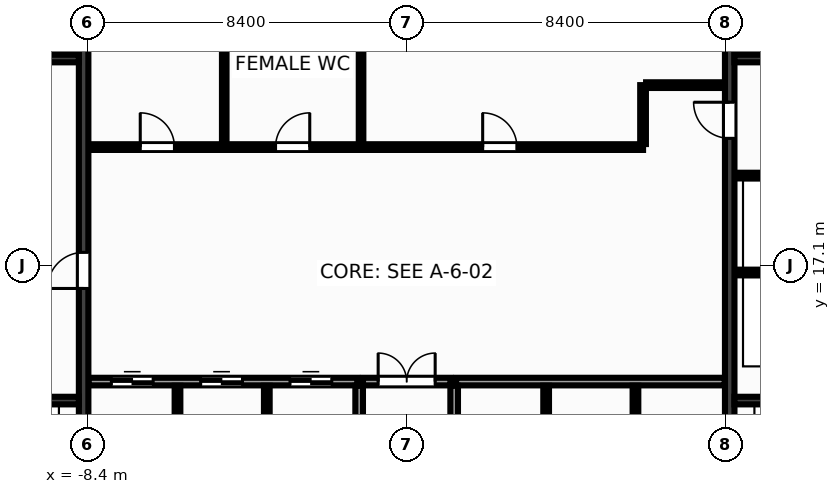
"""IFC4 building model, lengths in metres.
Left out: names, types, materials, properties, quantities, classifications, styles, units other than length and angle.
Written with IfcOpenShell. Run it as: python <this file> out.ifc"""

import sys

from ifc_helpers import new_model, si_unit, direction, frame, frame_2d, origin, place, context, subcontext, project, spatial, rectangle, extrude, source, transform, mapped, element, fill, save


model = new_model("IFC4")
c1 = context("Model", 3, precision=1e-05, world=origin(), true_north=direction((0.0, 1.0)))
c2 = subcontext(c1, "Body", "Model", "MODEL_VIEW")
j1 = project(units=[si_unit("LENGTHUNIT", "METRE"), si_unit("PLANEANGLEUNIT", "RADIAN")], contexts=[c1])
p1 = place(None, origin())
s1 = spatial("IfcSite", under=j1, at=p1, CompositionType="ELEMENT")
p2 = place(p1, origin())
s2 = spatial("IfcBuilding", under=s1, at=p2, CompositionType="ELEMENT")
p3 = place(p2, frame((0.0, 0.0, 5.0)))
s3 = spatial("IfcBuildingStorey", under=s2, at=p3, CompositionType="ELEMENT", Elevation=5.0)
m1 = source(origin(), c2, "Body", "SweptSolid", [
    extrude(rectangle(XDim=12.8, YDim=0.25, at=frame_2d((6.4, 0.0))), origin(), (0.0, 0.0, 1.0), 4.65),
])
p4 = place(p3, frame((-8.5, 10.6, 0.0), z_axis=(0.0, 0.0, 1.0), x_axis=(0.0, 1.0, 0.0)))
e1 = element("IfcWall", 1, at=p4, inside=s3, PredefinedType="SHEAR", context=c2, shape_type="MappedRepresentation", body=[
    mapped(m1, transform((0.0, 0.0, 0.0), x_axis=(1.0, 0.0, 0.0), y_axis=(0.0, 1.0, 0.0), z_axis=(0.0, 0.0, 1.0), scale=1.0)),
])
p5 = place(p4, frame((5.9, 0.0, 0.0)))
e2 = element("IfcOpeningElement", 2, at=p5, cuts=e1, PredefinedType="OPENING", context=c2, shape_type="SweptSolid", body=[
    extrude(rectangle(XDim=0.95, YDim=2.15, at=frame_2d((0.475, 1.075))), frame((0.0, 0.137, 0.0), z_axis=(0.0, -1.0, 0.0), x_axis=(1.0, 0.0, 0.0)), (0.0, 0.0, 1.0), 0.274),
])
p6 = place(p3, frame((8.5, 10.6, 0.0), z_axis=(0.0, 0.0, 1.0), x_axis=(0.0, 1.0, 0.0)))
e3 = element("IfcWall", 3, at=p6, inside=s3, PredefinedType="SHEAR", context=c2, shape_type="MappedRepresentation", body=[
    mapped(m1, transform((0.0, 0.0, 0.0), x_axis=(1.0, 0.0, 0.0), y_axis=(0.0, 1.0, 0.0), z_axis=(0.0, 0.0, 1.0), scale=1.0)),
])
p7 = place(p6, frame((9.85, 0.0, 0.0)))
e4 = element("IfcOpeningElement", 4, at=p7, cuts=e3, PredefinedType="OPENING", context=c2, shape_type="SweptSolid", body=[
    extrude(rectangle(XDim=0.95, YDim=2.15, at=frame_2d((0.475, 1.075))), frame((0.0, 0.137, 0.0), z_axis=(0.0, -1.0, 0.0), x_axis=(1.0, 0.0, 0.0)), (0.0, 0.0, 1.0), 0.274),
])
m2 = source(origin(), c2, "Body", "SweptSolid", [
    extrude(rectangle(XDim=2.825, YDim=0.2, at=frame_2d((1.413, 0.0))), origin(), (0.0, 0.0, 1.0), 4.65),
])
for number, where, z_axis, x_axis in (
    (5, (-11.45, 13.55, 0.0), (0.0, 0.0, 1.0), (1.0, 0.0, 0.0)),
    (6, (8.625, 13.55, 0.0), (0.0, 0.0, 1.0), (1.0, 0.0, 0.0)),
):
    element("IfcWall", number, at=place(p3, frame(where, z_axis=z_axis, x_axis=x_axis)), inside=s3, PredefinedType="SHEAR", context=c2, shape_type="MappedRepresentation", body=[
        mapped(m2, transform((0.0, 0.0, 0.0), x_axis=(1.0, 0.0, 0.0), y_axis=(0.0, 1.0, 0.0), z_axis=(0.0, 0.0, 1.0), scale=1.0)),
    ])
m3 = source(origin(), c2, "Body", "SweptSolid", [
    extrude(rectangle(XDim=3.02, YDim=0.2, at=frame_2d((1.51, 0.0))), origin(), (0.0, 0.0, 1.0), 4.65),
])
for number, where, z_axis, x_axis in (
    (7, (-11.645, 22.55, 0.0), (0.0, 0.0, 1.0), (1.0, 0.0, 0.0)),
    (8, (8.625, 22.55, 0.0), (0.0, 0.0, 1.0), (1.0, 0.0, 0.0)),
):
    element("IfcWall", number, at=place(p3, frame(where, z_axis=z_axis, x_axis=x_axis)), inside=s3, PredefinedType="SHEAR", context=c2, shape_type="MappedRepresentation", body=[
        mapped(m3, transform((0.0, 0.0, 0.0), x_axis=(1.0, 0.0, 0.0), y_axis=(0.0, 1.0, 0.0), z_axis=(0.0, 0.0, 1.0), scale=1.0)),
    ])
m4 = source(origin(), c2, "Body", "SweptSolid", [
    extrude(rectangle(XDim=3.01, YDim=0.15, at=frame_2d((1.505, 0.0))), origin(), (0.0, 0.0, 1.0), 4.37),
])
for number, where, z_axis, x_axis in (
    (9, (8.63, 16.92, 0.0), (0.0, 0.0, 1.0), (1.0, 0.0, 0.0)),
    (10, (8.63, 19.47, 0.0), (0.0, 0.0, 1.0), (1.0, 0.0, 0.0)),
):
    element("IfcWall", number, at=place(p3, frame(where, z_axis=z_axis, x_axis=x_axis)), inside=s3, PredefinedType="PARTITIONING", context=c2, shape_type="MappedRepresentation", body=[
        mapped(m4, transform((0.0, 0.0, 0.0), x_axis=(1.0, 0.0, 0.0), y_axis=(0.0, 1.0, 0.0), z_axis=(0.0, 0.0, 1.0), scale=1.0)),
    ])
m5 = source(origin(), c2, "Body", "SweptSolid", [
    extrude(rectangle(XDim=7.07, YDim=0.2, at=frame_2d((3.535, 0.0))), origin(), (0.0, 0.0, 1.0), 4.37),
])
p8 = place(p3, frame((-8.37, 14.05, 0.0), z_axis=(0.0, 0.0, 1.0), x_axis=(1.0, 0.0, 0.0)))
e11 = element("IfcWall", 11, at=p8, inside=s3, PredefinedType="PARTITIONING", context=c2, shape_type="MappedRepresentation", body=[
    mapped(m5, transform((0.0, 0.0, 0.0), x_axis=(1.0, 0.0, 0.0), y_axis=(0.0, 1.0, 0.0), z_axis=(0.0, 0.0, 1.0), scale=1.0)),
])
p9 = place(p8, frame((0.6, 0.0, 0.0)))
e12 = element("IfcOpeningElement", 12, at=p9, cuts=e11, PredefinedType="OPENING", context=c2, shape_type="SweptSolid", body=[
    extrude(rectangle(XDim=1.1, YDim=2.15, at=frame_2d((0.55, 1.075))), frame((0.0, 0.112, 0.0), z_axis=(0.0, -1.0, 0.0), x_axis=(1.0, 0.0, 0.0)), (0.0, 0.0, 1.0), 0.224),
])
p10 = place(p8, frame((2.95, 0.0, 0.0)))
e13 = element("IfcOpeningElement", 13, at=p10, cuts=e11, PredefinedType="OPENING", context=c2, shape_type="SweptSolid", body=[
    extrude(rectangle(XDim=1.1, YDim=2.15, at=frame_2d((0.55, 1.075))), frame((0.0, 0.112, 0.0), z_axis=(0.0, -1.0, 0.0), x_axis=(1.0, 0.0, 0.0)), (0.0, 0.0, 1.0), 0.224),
])
p11 = place(p8, frame((5.3, 0.0, 0.0)))
e14 = element("IfcOpeningElement", 14, at=p11, cuts=e11, PredefinedType="OPENING", context=c2, shape_type="SweptSolid", body=[
    extrude(rectangle(XDim=1.1, YDim=2.15, at=frame_2d((0.55, 1.075))), frame((0.0, 0.112, 0.0), z_axis=(0.0, -1.0, 0.0), x_axis=(1.0, 0.0, 0.0)), (0.0, 0.0, 1.0), 0.224),
])
p12 = place(p3, frame((1.3, 14.05, 0.0), z_axis=(0.0, 0.0, 1.0), x_axis=(1.0, 0.0, 0.0)))
e15 = element("IfcWall", 15, at=p12, inside=s3, PredefinedType="PARTITIONING", context=c2, shape_type="MappedRepresentation", body=[
    mapped(m5, transform((0.0, 0.0, 0.0), x_axis=(1.0, 0.0, 0.0), y_axis=(0.0, 1.0, 0.0), z_axis=(0.0, 0.0, 1.0), scale=1.0)),
])
m6 = source(origin(), c2, "Body", "SweptSolid", [
    extrude(rectangle(XDim=3.34, YDim=0.2, at=frame_2d((1.67, 0.0))), origin(), (0.0, 0.0, 1.0), 4.37),
])
for number, where, z_axis, x_axis in (
    (16, (-1.25, 10.6, 0.0), (0.0, 0.0, 1.0), (0.0, 1.0, 0.0)),
    (17, (1.25, 10.6, 0.0), (0.0, 0.0, 1.0), (0.0, 1.0, 0.0)),
):
    element("IfcWall", number, at=place(p3, frame(where, z_axis=z_axis, x_axis=x_axis)), inside=s3, PredefinedType="PARTITIONING", context=c2, shape_type="MappedRepresentation", body=[
        mapped(m6, transform((0.0, 0.0, 0.0), x_axis=(1.0, 0.0, 0.0), y_axis=(0.0, 1.0, 0.0), z_axis=(0.0, 0.0, 1.0), scale=1.0)),
    ])
m7 = source(origin(), c2, "Body", "SweptSolid", [
    extrude(rectangle(XDim=2.3, YDim=0.2, at=frame_2d((1.15, 0.0))), origin(), (0.0, 0.0, 1.0), 4.37),
])
p13 = place(p3, frame((-1.15, 14.05, 0.0), z_axis=(0.0, 0.0, 1.0), x_axis=(1.0, 0.0, 0.0)))
e18 = element("IfcWall", 18, at=p13, inside=s3, PredefinedType="PARTITIONING", context=c2, shape_type="MappedRepresentation", body=[
    mapped(m7, transform((0.0, 0.0, 0.0), x_axis=(1.0, 0.0, 0.0), y_axis=(0.0, 1.0, 0.0), z_axis=(0.0, 0.0, 1.0), scale=1.0)),
])
p14 = place(p13, frame((0.4, 0.0, 0.0)))
e19 = element("IfcOpeningElement", 19, at=p14, cuts=e18, PredefinedType="OPENING", context=c2, shape_type="SweptSolid", body=[
    extrude(rectangle(XDim=1.5, YDim=2.2, at=frame_2d((0.75, 1.1))), frame((0.0, 0.112, 0.0), z_axis=(0.0, -1.0, 0.0), x_axis=(1.0, 0.0, 0.0)), (0.0, 0.0, 1.0), 0.224),
])
m8 = source(origin(), c2, "Body", "SweptSolid", [
    extrude(rectangle(XDim=14.59, YDim=0.15, at=frame_2d((7.295, 0.0))), origin(), (0.0, 0.0, 1.0), 4.37),
])
p15 = place(p3, frame((-8.37, 20.22, 0.0), z_axis=(0.0, 0.0, 1.0), x_axis=(1.0, 0.0, 0.0)))
e20 = element("IfcWall", 20, at=p15, inside=s3, PredefinedType="PARTITIONING", context=c2, shape_type="MappedRepresentation", body=[
    mapped(m8, transform((0.0, 0.0, 0.0), x_axis=(1.0, 0.0, 0.0), y_axis=(0.0, 1.0, 0.0), z_axis=(0.0, 0.0, 1.0), scale=1.0)),
])
p16 = place(p15, frame((1.36, 0.0, 0.0)))
e21 = element("IfcOpeningElement", 21, at=p16, cuts=e20, PredefinedType="OPENING", context=c2, shape_type="SweptSolid", body=[
    extrude(rectangle(XDim=0.9, YDim=2.15, at=frame_2d((0.45, 1.075))), frame((0.0, 0.087, 0.0), z_axis=(0.0, -1.0, 0.0), x_axis=(1.0, 0.0, 0.0)), (0.0, 0.0, 1.0), 0.174),
])
p17 = place(p15, frame((4.92, 0.0, 0.0)))
e22 = element("IfcOpeningElement", 22, at=p17, cuts=e20, PredefinedType="OPENING", context=c2, shape_type="SweptSolid", body=[
    extrude(rectangle(XDim=0.9, YDim=2.15, at=frame_2d((0.45, 1.075))), frame((0.0, 0.087, 0.0), z_axis=(0.0, -1.0, 0.0), x_axis=(1.0, 0.0, 0.0)), (0.0, 0.0, 1.0), 0.174),
])
p18 = place(p15, frame((10.37, 0.0, 0.0)))
e23 = element("IfcOpeningElement", 23, at=p18, cuts=e20, PredefinedType="OPENING", context=c2, shape_type="SweptSolid", body=[
    extrude(rectangle(XDim=0.9, YDim=2.15, at=frame_2d((0.45, 1.075))), frame((0.0, 0.087, 0.0), z_axis=(0.0, -1.0, 0.0), x_axis=(1.0, 0.0, 0.0)), (0.0, 0.0, 1.0), 0.174),
])
m9 = source(origin(), c2, "Body", "SweptSolid", [
    extrude(rectangle(XDim=1.55, YDim=0.15, at=frame_2d((0.775, 0.0))), origin(), (0.0, 0.0, 1.0), 4.37),
])
p19 = place(p3, frame((6.22, 20.3, 0.0), z_axis=(0.0, 0.0, 1.0), x_axis=(0.0, 1.0, 0.0)))
e24 = element("IfcWall", 24, at=p19, inside=s3, PredefinedType="PARTITIONING", context=c2, shape_type="MappedRepresentation", body=[
    mapped(m9, transform((0.0, 0.0, 0.0), x_axis=(1.0, 0.0, 0.0), y_axis=(0.0, 1.0, 0.0), z_axis=(0.0, 0.0, 1.0), scale=1.0)),
])
m10 = source(origin(), c2, "Body", "SweptSolid", [
    extrude(rectangle(XDim=2.07, YDim=0.15, at=frame_2d((1.035, 0.0))), origin(), (0.0, 0.0, 1.0), 4.37),
])
p20 = place(p3, frame((6.3, 21.85, 0.0), z_axis=(0.0, 0.0, 1.0), x_axis=(1.0, 0.0, 0.0)))
e25 = element("IfcWall", 25, at=p20, inside=s3, PredefinedType="PARTITIONING", context=c2, shape_type="MappedRepresentation", body=[
    mapped(m10, transform((0.0, 0.0, 0.0), x_axis=(1.0, 0.0, 0.0), y_axis=(0.0, 1.0, 0.0), z_axis=(0.0, 0.0, 1.0), scale=1.0)),
])
m11 = source(origin(), c2, "Body", "SweptSolid", [
    extrude(rectangle(XDim=3.34, YDim=0.15, at=frame_2d((1.67, 0.0))), origin(), (0.0, 0.0, 1.0), 4.37),
])
for number, where, z_axis, x_axis in (
    (26, (-6.03, 10.6, 0.0), (0.0, 0.0, 1.0), (0.0, 1.0, 0.0)),
    (27, (-3.68, 10.6, 0.0), (0.0, 0.0, 1.0), (0.0, 1.0, 0.0)),
    (28, (3.67, 10.6, 0.0), (0.0, 0.0, 1.0), (0.0, 1.0, 0.0)),
    (29, (6.02, 10.6, 0.0), (0.0, 0.0, 1.0), (0.0, 1.0, 0.0)),
):
    element("IfcWall", number, at=place(p3, frame(where, z_axis=z_axis, x_axis=x_axis)), inside=s3, PredefinedType="PARTITIONING", context=c2, shape_type="MappedRepresentation", body=[
        mapped(m11, transform((0.0, 0.0, 0.0), x_axis=(1.0, 0.0, 0.0), y_axis=(0.0, 1.0, 0.0), z_axis=(0.0, 0.0, 1.0), scale=1.0)),
    ])
m12 = source(origin(), c2, "Body", "SweptSolid", [
    extrude(rectangle(XDim=3.04, YDim=0.12, at=frame_2d((1.52, 0.0))), origin(), (0.0, 0.0, 1.0), 4.37),
])
for number, where, z_axis, x_axis in (
    (30, (-4.8, 20.32, 0.0), (0.0, 0.0, 1.0), (0.0, 1.0, 0.0)),
    (31, (-1.2, 20.32, 0.0), (0.0, 0.0, 1.0), (0.0, 1.0, 0.0)),
):
    element("IfcWall", number, at=place(p3, frame(where, z_axis=z_axis, x_axis=x_axis)), inside=s3, PredefinedType="PARTITIONING", context=c2, shape_type="MappedRepresentation", body=[
        mapped(m12, transform((0.0, 0.0, 0.0), x_axis=(1.0, 0.0, 0.0), y_axis=(0.0, 1.0, 0.0), z_axis=(0.0, 0.0, 1.0), scale=1.0)),
    ])
m13 = source(origin(), c2, "Body", "SweptSolid", [
    extrude(rectangle(XDim=0.95, YDim=2.15, at=frame_2d((0.475, 1.075))), frame((0.0, 0.025, 0.0), z_axis=(0.0, -1.0, 0.0), x_axis=(1.0, 0.0, 0.0)), (0.0, 0.0, 1.0), 0.05),
])
p21 = place(p5, origin())
e32 = element("IfcDoor", 32, at=p21, inside=s3, OperationType="SINGLE_SWING_LEFT", PredefinedType="DOOR", context=c2, shape_type="MappedRepresentation", body=[
    mapped(m13, transform((0.0, 0.0, 0.0), x_axis=(1.0, 0.0, 0.0), y_axis=(0.0, 1.0, 0.0), z_axis=(0.0, 0.0, 1.0), scale=1.0)),
])
fill(e2, e32)
m14 = source(origin(), c2, "Body", "SweptSolid", [
    extrude(rectangle(XDim=0.95, YDim=2.15, at=frame_2d((0.475, 1.075))), frame((0.0, 0.025, 0.0), z_axis=(0.0, -1.0, 0.0), x_axis=(1.0, 0.0, 0.0)), (0.0, 0.0, 1.0), 0.05),
])
p22 = place(p7, origin())
e33 = element("IfcDoor", 33, at=p22, inside=s3, OperationType="SINGLE_SWING_RIGHT", PredefinedType="DOOR", context=c2, shape_type="MappedRepresentation", body=[
    mapped(m14, transform((0.0, 0.0, 0.0), x_axis=(1.0, 0.0, 0.0), y_axis=(0.0, 1.0, 0.0), z_axis=(0.0, 0.0, 1.0), scale=1.0)),
])
fill(e4, e33)
m15 = source(origin(), c2, "Body", "SweptSolid", [
    extrude(rectangle(XDim=1.1, YDim=2.15, at=frame_2d((0.55, 1.075))), frame((0.0, 0.025, 0.0), z_axis=(0.0, -1.0, 0.0), x_axis=(1.0, 0.0, 0.0)), (0.0, 0.0, 1.0), 0.05),
])
p23 = place(p9, origin())
e34 = element("IfcDoor", 34, at=p23, inside=s3, OperationType="DOUBLE_DOOR_SLIDING", PredefinedType="DOOR", context=c2, shape_type="MappedRepresentation", body=[
    mapped(m15, transform((0.0, 0.0, 0.0), x_axis=(1.0, 0.0, 0.0), y_axis=(0.0, 1.0, 0.0), z_axis=(0.0, 0.0, 1.0), scale=1.0)),
])
fill(e12, e34)
p24 = place(p10, origin())
e35 = element("IfcDoor", 35, at=p24, inside=s3, OperationType="DOUBLE_DOOR_SLIDING", PredefinedType="DOOR", context=c2, shape_type="MappedRepresentation", body=[
    mapped(m15, transform((0.0, 0.0, 0.0), x_axis=(1.0, 0.0, 0.0), y_axis=(0.0, 1.0, 0.0), z_axis=(0.0, 0.0, 1.0), scale=1.0)),
])
fill(e13, e35)
p25 = place(p11, origin())
e36 = element("IfcDoor", 36, at=p25, inside=s3, OperationType="DOUBLE_DOOR_SLIDING", PredefinedType="DOOR", context=c2, shape_type="MappedRepresentation", body=[
    mapped(m15, transform((0.0, 0.0, 0.0), x_axis=(1.0, 0.0, 0.0), y_axis=(0.0, 1.0, 0.0), z_axis=(0.0, 0.0, 1.0), scale=1.0)),
])
fill(e14, e36)
m16 = source(origin(), c2, "Body", "SweptSolid", [
    extrude(rectangle(XDim=1.5, YDim=2.2, at=frame_2d((0.75, 1.1))), frame((0.0, 0.025, 0.0), z_axis=(0.0, -1.0, 0.0), x_axis=(1.0, 0.0, 0.0)), (0.0, 0.0, 1.0), 0.05),
])
p26 = place(p14, origin())
e37 = element("IfcDoor", 37, at=p26, inside=s3, OperationType="DOUBLE_DOOR_SINGLE_SWING", PredefinedType="DOOR", context=c2, shape_type="MappedRepresentation", body=[
    mapped(m16, transform((0.0, 0.0, 0.0), x_axis=(1.0, 0.0, 0.0), y_axis=(0.0, 1.0, 0.0), z_axis=(0.0, 0.0, 1.0), scale=1.0)),
])
fill(e19, e37)
m17 = source(origin(), c2, "Body", "SweptSolid", [
    extrude(rectangle(XDim=0.9, YDim=2.15, at=frame_2d((0.45, 1.075))), frame((0.0, 0.025, 0.0), z_axis=(0.0, -1.0, 0.0), x_axis=(1.0, 0.0, 0.0)), (0.0, 0.0, 1.0), 0.05),
])
p27 = place(p16, origin())
e38 = element("IfcDoor", 38, at=p27, inside=s3, OperationType="SINGLE_SWING_LEFT", PredefinedType="DOOR", context=c2, shape_type="MappedRepresentation", body=[
    mapped(m17, transform((0.0, 0.0, 0.0), x_axis=(1.0, 0.0, 0.0), y_axis=(0.0, 1.0, 0.0), z_axis=(0.0, 0.0, 1.0), scale=1.0)),
])
fill(e21, e38)
p28 = place(p17, origin())
e39 = element("IfcDoor", 39, at=p28, inside=s3, OperationType="SINGLE_SWING_RIGHT", PredefinedType="DOOR", context=c2, shape_type="MappedRepresentation", body=[
    mapped(m17, transform((0.0, 0.0, 0.0), x_axis=(1.0, 0.0, 0.0), y_axis=(0.0, 1.0, 0.0), z_axis=(0.0, 0.0, 1.0), scale=1.0)),
])
fill(e22, e39)
p29 = place(p18, origin())
e40 = element("IfcDoor", 40, at=p29, inside=s3, OperationType="SINGLE_SWING_LEFT", PredefinedType="DOOR", context=c2, shape_type="MappedRepresentation", body=[
    mapped(m17, transform((0.0, 0.0, 0.0), x_axis=(1.0, 0.0, 0.0), y_axis=(0.0, 1.0, 0.0), z_axis=(0.0, 0.0, 1.0), scale=1.0)),
])
fill(e23, e40)
save(model, sys.argv[1])
